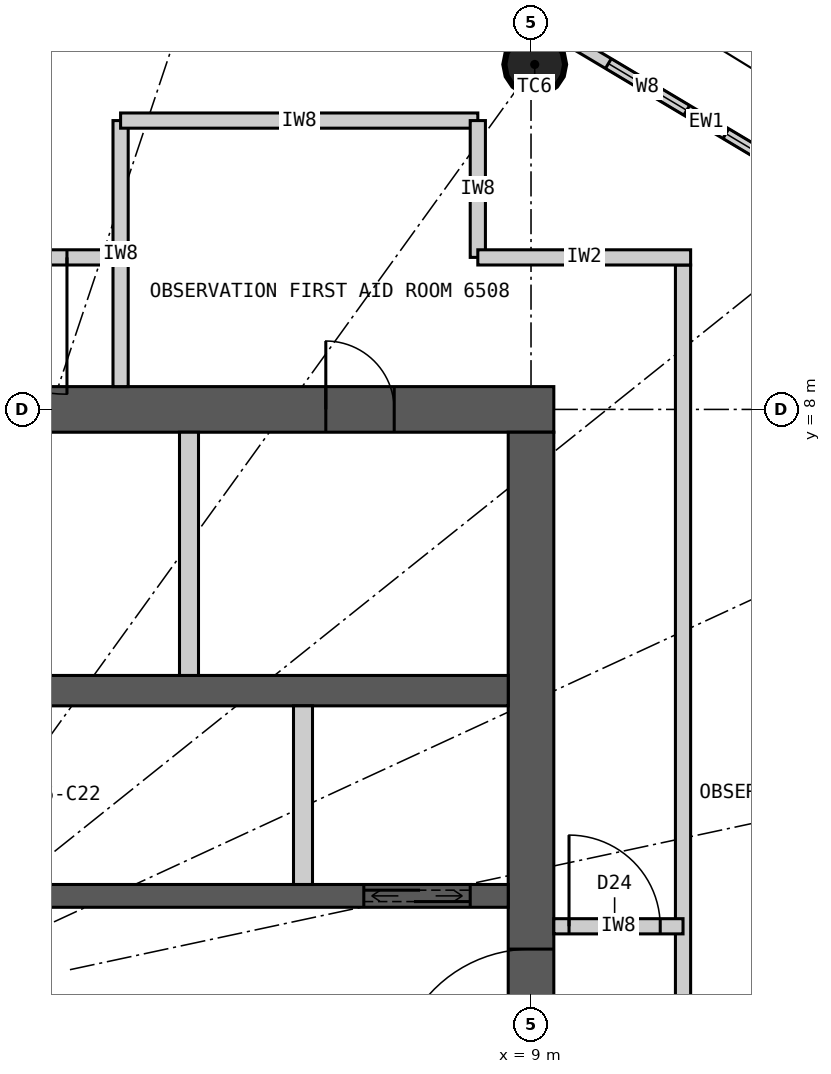
"""IFC4 building model, lengths in metres.
Left out: names, types, materials, properties, quantities, classifications, styles, units other than length and angle.
Written with IfcOpenShell. Run it as: python <this file> out.ifc"""

import sys

from ifc_helpers import new_model, si_unit, direction, frame, frame_2d, origin, origin_2d, place, context, subcontext, project, spatial, rectangle, circle, extrude, element, fill, save


model = new_model("IFC4")
c1 = context("Model", 3, precision=1e-05, world=origin(), true_north=direction((0.0, 1.0)))
c2 = subcontext(c1, "Body", "Model", "MODEL_VIEW")
j1 = project(units=[si_unit("LENGTHUNIT", "METRE"), si_unit("PLANEANGLEUNIT", "RADIAN")], contexts=[c1])
p1 = place(None, origin())
s1 = spatial("IfcSite", under=j1, at=p1, CompositionType="ELEMENT")
p2 = place(p1, origin())
s2 = spatial("IfcBuilding", under=s1, at=p2, CompositionType="ELEMENT")
p3 = place(p2, frame((0.0, 0.0, 242.7)))
s3 = spatial("IfcBuildingStorey", under=s2, at=p3, CompositionType="ELEMENT", Elevation=242.7)
p4 = place(p3, frame((9.049, 12.538, 0.0), z_axis=(0.0, 0.0, 1.0), x_axis=(1.0, 0.0, 0.0)))
e1 = element("IfcColumn", 1, at=p4, inside=s3, PredefinedType="COLUMN", context=c2, shape_type="SweptSolid", body=[
    extrude(circle(Radius=0.4, at=origin_2d()), origin(), (0.0, 0.0, 1.0), 6.0),
])
p5 = place(p3, frame((-9.3, 8.0, 0.0), z_axis=(0.0, 0.0, 1.0), x_axis=(1.0, 0.0, 0.0)))
e2 = element("IfcWall", 2, at=p5, inside=s3, PredefinedType="SHEAR", context=c2, shape_type="SweptSolid", body=[
    extrude(rectangle(XDim=18.6, YDim=0.6, at=frame_2d((9.3, 0.0))), origin(), (0.0, 0.0, 1.0), 6.0),
])
p6 = place(p5, frame((8.0, 0.0, 0.0)))
e3 = element("IfcOpeningElement", 3, at=p6, cuts=e2, PredefinedType="OPENING", context=c2, shape_type="SweptSolid", body=[
    extrude(rectangle(XDim=1.2, YDim=2.2, at=frame_2d((0.6, 1.1))), frame((0.0, 0.31, 0.0), z_axis=(0.0, -1.0, 0.0), x_axis=(1.0, 0.0, 0.0)), (0.0, 0.0, 1.0), 0.62),
])
p7 = place(p5, frame((15.6, 0.0, 0.0)))
e4 = element("IfcOpeningElement", 4, at=p7, cuts=e2, PredefinedType="OPENING", context=c2, shape_type="SweptSolid", body=[
    extrude(rectangle(XDim=0.9, YDim=2.2, at=frame_2d((0.45, 1.1))), frame((0.0, 0.31, 0.0), z_axis=(0.0, -1.0, 0.0), x_axis=(1.0, 0.0, 0.0)), (0.0, 0.0, 1.0), 0.62),
])
p8 = place(p3, frame((9.0, -7.7, 0.0), z_axis=(0.0, 0.0, 1.0), x_axis=(0.0, 1.0, 0.0)))
e5 = element("IfcWall", 5, at=p8, inside=s3, PredefinedType="SHEAR", context=c2, shape_type="SweptSolid", body=[
    extrude(rectangle(XDim=15.4, YDim=0.6, at=frame_2d((7.7, 0.0))), origin(), (0.0, 0.0, 1.0), 6.0),
])
p9 = place(p8, frame((6.8, 0.0, 0.0)))
e6 = element("IfcOpeningElement", 6, at=p9, cuts=e5, PredefinedType="OPENING", context=c2, shape_type="SweptSolid", body=[
    extrude(rectangle(XDim=1.8, YDim=2.2, at=frame_2d((0.9, 1.1))), frame((0.0, 0.31, 0.0), z_axis=(0.0, -1.0, 0.0), x_axis=(1.0, 0.0, 0.0)), (0.0, 0.0, 1.0), 0.62),
])
p10 = place(p3, frame((-8.7, 4.3, 0.0), z_axis=(0.0, 0.0, 1.0), x_axis=(1.0, 0.0, 0.0)))
e7 = element("IfcWall", 7, at=p10, inside=s3, PredefinedType="SHEAR", context=c2, shape_type="SweptSolid", body=[
    extrude(rectangle(XDim=17.4, YDim=0.4, at=frame_2d((8.7, 0.0))), origin(), (0.0, 0.0, 1.0), 6.0),
])
p11 = place(p3, frame((-8.7, 1.6, 0.0), z_axis=(0.0, 0.0, 1.0), x_axis=(1.0, 0.0, 0.0)))
e8 = element("IfcWall", 8, at=p11, inside=s3, PredefinedType="SHEAR", context=c2, shape_type="SweptSolid", body=[
    extrude(rectangle(XDim=17.4, YDim=0.3, at=frame_2d((8.7, 0.0))), origin(), (0.0, 0.0, 1.0), 6.0),
])
p12 = place(p11, frame((15.5, 0.0, 0.0)))
e9 = element("IfcOpeningElement", 9, at=p12, cuts=e8, PredefinedType="OPENING", context=c2, shape_type="SweptSolid", body=[
    extrude(rectangle(XDim=1.4, YDim=2.4, at=frame_2d((0.7, 1.2))), frame((0.0, 0.16, 0.0), z_axis=(0.0, -1.0, 0.0), x_axis=(1.0, 0.0, 0.0)), (0.0, 0.0, 1.0), 0.32),
])
p13 = place(p11, frame((2.25, 0.0, 0.0)))
e10 = element("IfcOpeningElement", 10, at=p13, cuts=e8, PredefinedType="OPENING", context=c2, shape_type="SweptSolid", body=[
    extrude(rectangle(XDim=0.9, YDim=2.2, at=frame_2d((0.45, 1.1))), frame((0.0, 0.16, 0.0), z_axis=(0.0, -1.0, 0.0), x_axis=(1.0, 0.0, 0.0)), (0.0, 0.0, 1.0), 0.32),
])
p14 = place(p11, frame((9.75, 0.0, 0.0)))
e11 = element("IfcOpeningElement", 11, at=p14, cuts=e8, PredefinedType="OPENING", context=c2, shape_type="SweptSolid", body=[
    extrude(rectangle(XDim=0.9, YDim=2.2, at=frame_2d((0.45, 1.1))), frame((0.0, 0.16, 0.0), z_axis=(0.0, -1.0, 0.0), x_axis=(1.0, 0.0, 0.0)), (0.0, 0.0, 1.0), 0.32),
])
p15 = place(p3, frame((4.5, 4.5, 0.0), z_axis=(0.0, 0.0, 1.0), x_axis=(0.0, 1.0, 0.0)))
e12 = element("IfcWall", 12, at=p15, inside=s3, PredefinedType="PARTITIONING", context=c2, shape_type="SweptSolid", body=[
    extrude(rectangle(XDim=3.2, YDim=0.25, at=frame_2d((1.6, 0.0))), origin(), (0.0, 0.0, 1.0), 6.0),
])
p16 = place(p3, frame((6.0, 1.75, 0.0), z_axis=(0.0, 0.0, 1.0), x_axis=(0.0, 1.0, 0.0)))
e13 = element("IfcWall", 13, at=p16, inside=s3, PredefinedType="PARTITIONING", context=c2, shape_type="SweptSolid", body=[
    extrude(rectangle(XDim=2.35, YDim=0.25, at=frame_2d((1.175, 0.0))), origin(), (0.0, 0.0, 1.0), 6.0),
])
p17 = place(p3, frame((13.266, 10.613, 0.0), z_axis=(0.0, 0.0, 1.0), x_axis=(-0.858849230109, 0.512228464594, 0.0)))
e14 = element("IfcWall", 14, at=p17, inside=s3, PredefinedType="ELEMENTEDWALL", context=c2, shape_type="SweptSolid", body=[
    extrude(rectangle(XDim=4.564, YDim=0.15, at=frame_2d((2.282, 0.0))), origin(), (0.0, 0.0, 1.0), 5.7),
])
p18 = place(p17, frame((0.782, 0.0, 0.5)))
e15 = element("IfcOpeningElement", 15, at=p18, cuts=e14, PredefinedType="OPENING", context=c2, shape_type="SweptSolid", body=[
    extrude(rectangle(XDim=1.2, YDim=4.2, at=frame_2d((0.6, 2.1))), frame((0.0, 0.085, 0.0), z_axis=(0.0, -1.0, 0.0), x_axis=(1.0, 0.0, 0.0)), (0.0, 0.0, 1.0), 0.17),
])
p19 = place(p17, frame((2.582, 0.0, 0.5)))
e16 = element("IfcOpeningElement", 16, at=p19, cuts=e14, PredefinedType="OPENING", context=c2, shape_type="SweptSolid", body=[
    extrude(rectangle(XDim=1.2, YDim=4.2, at=frame_2d((0.6, 2.1))), frame((0.0, 0.085, 0.0), z_axis=(0.0, -1.0, 0.0), x_axis=(1.0, 0.0, 0.0)), (0.0, 0.0, 1.0), 0.17),
])
p20 = place(p3, frame((-11.1, 10.0, 0.0), z_axis=(0.0, 0.0, 1.0), x_axis=(1.0, 0.0, 0.0)))
e17 = element("IfcWall", 17, at=p20, inside=s3, PredefinedType="PARTITIONING", context=c2, shape_type="SweptSolid", body=[
    extrude(rectangle(XDim=14.7, YDim=0.2, at=frame_2d((7.35, 0.0))), origin(), (0.0, 0.0, 1.0), 5.7),
])
p21 = place(p20, frame((5.2, 0.0, 0.0)))
e18 = element("IfcOpeningElement", 18, at=p21, cuts=e17, PredefinedType="OPENING", context=c2, shape_type="SweptSolid", body=[
    extrude(rectangle(XDim=1.8, YDim=2.4, at=frame_2d((0.9, 1.2))), frame((0.0, 0.11, 0.0), z_axis=(0.0, -1.0, 0.0), x_axis=(1.0, 0.0, 0.0)), (0.0, 0.0, 1.0), 0.22),
])
p22 = place(p20, frame((12.194, 0.0, 0.0)))
e19 = element("IfcOpeningElement", 19, at=p22, cuts=e17, PredefinedType="OPENING", context=c2, shape_type="SweptSolid", body=[
    extrude(rectangle(XDim=1.8, YDim=2.4, at=frame_2d((0.9, 1.2))), frame((0.0, 0.11, 0.0), z_axis=(0.0, -1.0, 0.0), x_axis=(1.0, 0.0, 0.0)), (0.0, 0.0, 1.0), 0.22),
])
p23 = place(p3, frame((11.0, -9.9, 0.0), z_axis=(0.0, 0.0, 1.0), x_axis=(0.0, 1.0, 0.0)))
e20 = element("IfcWall", 20, at=p23, inside=s3, PredefinedType="PARTITIONING", context=c2, shape_type="SweptSolid", body=[
    extrude(rectangle(XDim=19.8, YDim=0.2, at=frame_2d((9.9, 0.0))), origin(), (0.0, 0.0, 1.0), 5.7),
])
p24 = place(p23, frame((6.737, 0.0, 0.0)))
e21 = element("IfcOpeningElement", 21, at=p24, cuts=e20, PredefinedType="OPENING", context=c2, shape_type="SweptSolid", body=[
    extrude(rectangle(XDim=1.2, YDim=2.2, at=frame_2d((0.6, 1.1))), frame((0.0, 0.11, 0.0), z_axis=(0.0, -1.0, 0.0), x_axis=(1.0, 0.0, 0.0)), (0.0, 0.0, 1.0), 0.22),
])
p25 = place(p3, frame((3.6, 8.3, 0.0), z_axis=(0.0, 0.0, 1.0), x_axis=(0.0, 1.0, 0.0)))
e22 = element("IfcWall", 22, at=p25, inside=s3, PredefinedType="PARTITIONING", context=c2, shape_type="SweptSolid", body=[
    extrude(rectangle(XDim=3.5, YDim=0.2, at=frame_2d((1.75, 0.0))), origin(), (0.0, 0.0, 1.0), 5.7),
])
p26 = place(p3, frame((9.3, 1.2, 0.0), z_axis=(0.0, 0.0, 1.0), x_axis=(1.0, 0.0, 0.0)))
e23 = element("IfcWall", 23, at=p26, inside=s3, PredefinedType="PARTITIONING", context=c2, shape_type="SweptSolid", body=[
    extrude(rectangle(XDim=1.7, YDim=0.2, at=frame_2d((0.85, 0.0))), origin(), (0.0, 0.0, 1.0), 5.7),
])
p27 = place(p26, frame((0.2, 0.0, 0.0)))
e24 = element("IfcOpeningElement", 24, at=p27, cuts=e23, PredefinedType="OPENING", context=c2, shape_type="SweptSolid", body=[
    extrude(rectangle(XDim=1.2, YDim=2.2, at=frame_2d((0.6, 1.1))), frame((0.0, 0.11, 0.0), z_axis=(0.0, -1.0, 0.0), x_axis=(1.0, 0.0, 0.0)), (0.0, 0.0, 1.0), 0.22),
])
p28 = place(p3, frame((3.6, 11.8, 0.0), z_axis=(0.0, 0.0, 1.0), x_axis=(1.0, 0.0, 0.0)))
e25 = element("IfcWall", 25, at=p28, inside=s3, PredefinedType="PARTITIONING", context=c2, shape_type="SweptSolid", body=[
    extrude(rectangle(XDim=4.7, YDim=0.2, at=frame_2d((2.35, 0.0))), origin(), (0.0, 0.0, 1.0), 5.7),
])
p29 = place(p3, frame((8.3, 11.8, 0.0), z_axis=(0.0, 0.0, 1.0), x_axis=(0.0, -1.0, 0.0)))
e26 = element("IfcWall", 26, at=p29, inside=s3, PredefinedType="PARTITIONING", context=c2, shape_type="SweptSolid", body=[
    extrude(rectangle(XDim=1.8, YDim=0.2, at=frame_2d((0.9, 0.0))), origin(), (0.0, 0.0, 1.0), 5.7),
])
p30 = place(p3, frame((8.3, 10.0, 0.0), z_axis=(0.0, 0.0, 1.0), x_axis=(1.0, 0.0, 0.0)))
e27 = element("IfcWall", 27, at=p30, inside=s3, PredefinedType="PARTITIONING", context=c2, shape_type="SweptSolid", body=[
    extrude(rectangle(XDim=2.8, YDim=0.2, at=frame_2d((1.4, 0.0))), origin(), (0.0, 0.0, 1.0), 5.7),
])
p31 = place(p18, origin())
e28 = element("IfcWindow", 28, at=p31, inside=s3, PartitioningType="SINGLE_PANEL", PredefinedType="WINDOW", context=c2, shape_type="SweptSolid", body=[
    extrude(rectangle(XDim=1.2, YDim=4.2, at=frame_2d((0.6, 2.1))), frame((0.0, 0.03, 0.0), z_axis=(0.0, -1.0, 0.0), x_axis=(1.0, 0.0, 0.0)), (0.0, 0.0, 1.0), 0.06),
])
fill(e15, e28)
p32 = place(p19, origin())
e29 = element("IfcWindow", 29, at=p32, inside=s3, PartitioningType="SINGLE_PANEL", PredefinedType="WINDOW", context=c2, shape_type="SweptSolid", body=[
    extrude(rectangle(XDim=1.2, YDim=4.2, at=frame_2d((0.6, 2.1))), frame((0.0, 0.03, 0.0), z_axis=(0.0, -1.0, 0.0), x_axis=(1.0, 0.0, 0.0)), (0.0, 0.0, 1.0), 0.06),
])
fill(e16, e29)
p33 = place(p27, origin())
e30 = element("IfcDoor", 30, at=p33, inside=s3, OperationType="SINGLE_SWING_LEFT", PredefinedType="DOOR", context=c2, shape_type="SweptSolid", body=[
    extrude(rectangle(XDim=1.2, YDim=2.2, at=frame_2d((0.6, 1.1))), frame((0.0, 0.025, 0.0), z_axis=(0.0, -1.0, 0.0), x_axis=(1.0, 0.0, 0.0)), (0.0, 0.0, 1.0), 0.05),
])
fill(e24, e30)
p34 = place(p7, origin())
e31 = element("IfcDoor", 31, at=p34, inside=s3, OperationType="SINGLE_SWING_LEFT", PredefinedType="DOOR", context=c2, shape_type="SweptSolid", body=[
    extrude(rectangle(XDim=0.9, YDim=2.2, at=frame_2d((0.45, 1.1))), frame((0.0, 0.025, 0.0), z_axis=(0.0, -1.0, 0.0), x_axis=(1.0, 0.0, 0.0)), (0.0, 0.0, 1.0), 0.05),
])
fill(e4, e31)
p35 = place(p12, origin())
e32 = element("IfcDoor", 32, at=p35, inside=s3, OperationType="DOUBLE_DOOR_SLIDING", PredefinedType="DOOR", context=c2, shape_type="SweptSolid", body=[
    extrude(rectangle(XDim=1.4, YDim=2.4, at=frame_2d((0.7, 1.2))), frame((0.0, 0.025, 0.0), z_axis=(0.0, -1.0, 0.0), x_axis=(1.0, 0.0, 0.0)), (0.0, 0.0, 1.0), 0.05),
])
fill(e9, e32)
p36 = place(p9, origin())
e33 = element("IfcDoor", 33, at=p36, inside=s3, OperationType="DOUBLE_DOOR_DOUBLE_SWING", PredefinedType="DOOR", context=c2, shape_type="SweptSolid", body=[
    extrude(rectangle(XDim=1.8, YDim=2.2, at=frame_2d((0.9, 1.1))), frame((0.0, 0.025, 0.0), z_axis=(0.0, -1.0, 0.0), x_axis=(1.0, 0.0, 0.0)), (0.0, 0.0, 1.0), 0.05),
])
fill(e6, e33)
p37 = place(p22, origin())
e34 = element("IfcDoor", 34, at=p37, inside=s3, OperationType="DOUBLE_DOOR_DOUBLE_SWING", PredefinedType="DOOR", context=c2, shape_type="SweptSolid", body=[
    extrude(rectangle(XDim=1.8, YDim=2.4, at=frame_2d((0.9, 1.2))), frame((0.0, 0.025, 0.0), z_axis=(0.0, -1.0, 0.0), x_axis=(1.0, 0.0, 0.0)), (0.0, 0.0, 1.0), 0.05),
])
fill(e19, e34)
save(model, sys.argv[1])
